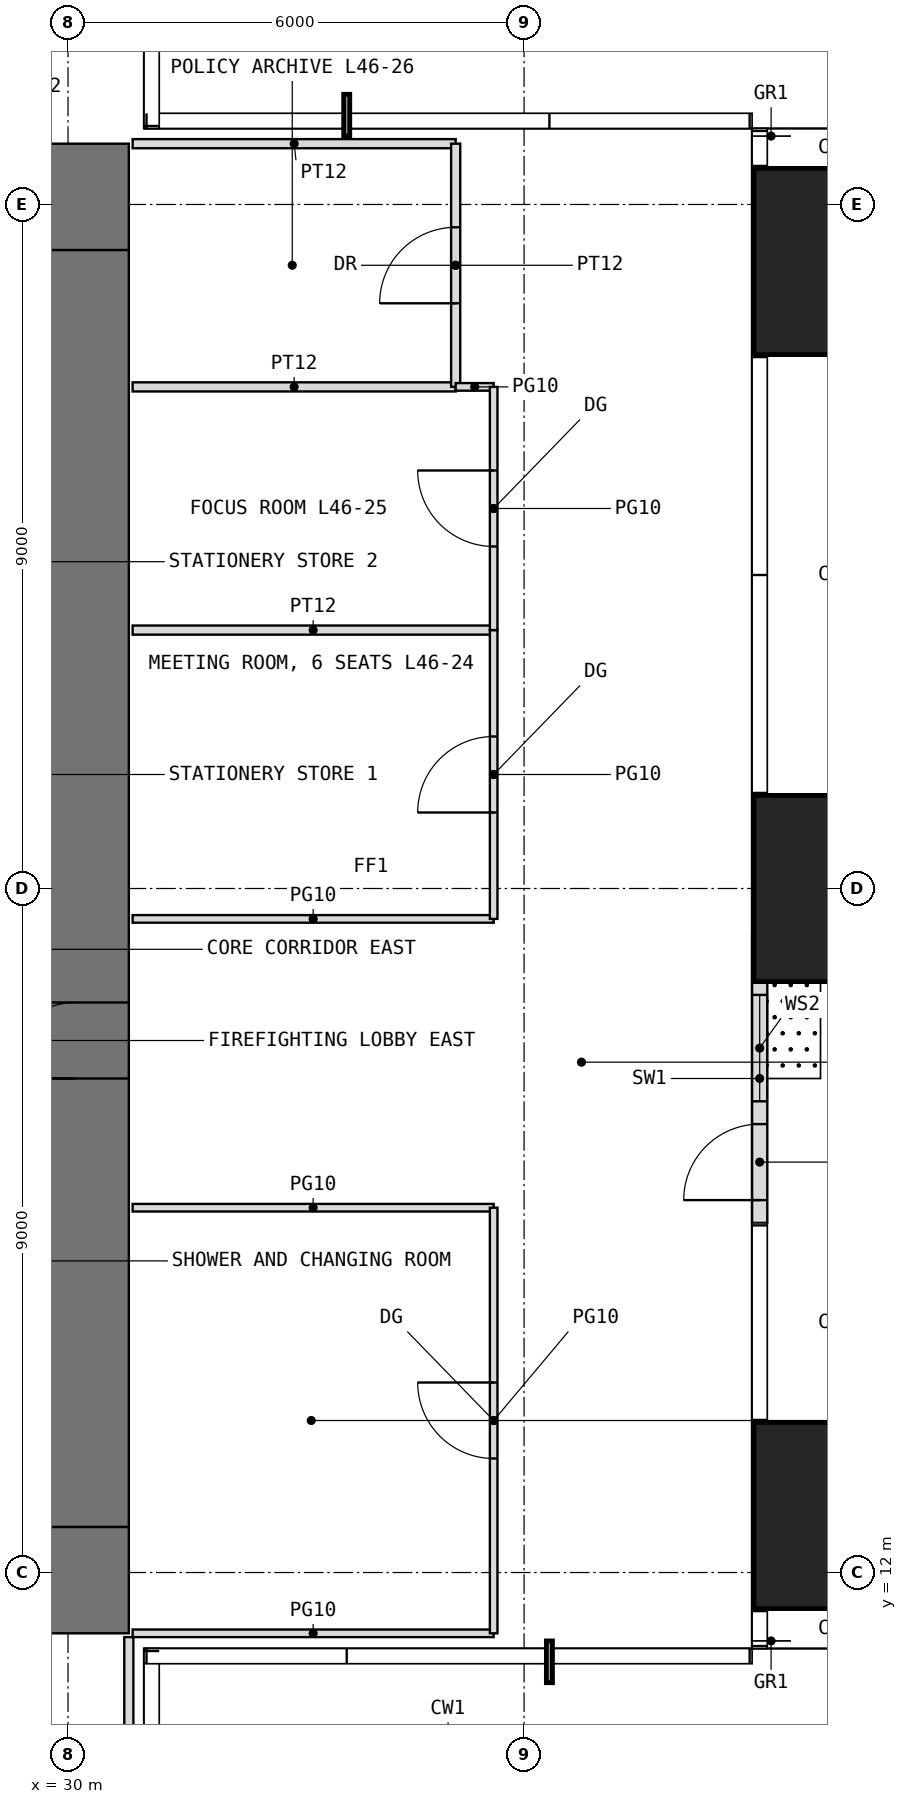
"""IFC4 building model, lengths in metres.
Left out: names, types, materials, properties, quantities, classifications, styles, units other than length and angle.
Written with IfcOpenShell. Run it as: python <this file> out.ifc"""

import sys

from ifc_helpers import new_model, si_unit, direction, frame, frame_2d, origin, origin_2d, place, context, subcontext, project, spatial, rectangle, extrude, element, fill, save


model = new_model("IFC4")
c1 = context("Model", 3, precision=1e-05, world=origin(), true_north=direction((0.0, 1.0)))
c2 = subcontext(c1, "Body", "Model", "MODEL_VIEW")
j1 = project(units=[si_unit("LENGTHUNIT", "METRE"), si_unit("PLANEANGLEUNIT", "RADIAN")], contexts=[c1])
p1 = place(None, origin())
s1 = spatial("IfcSite", under=j1, at=p1, CompositionType="ELEMENT")
p2 = place(p1, origin())
s2 = spatial("IfcBuilding", under=s1, at=p2, CompositionType="ELEMENT")
p3 = place(p2, frame((0.0, 0.0, 194.5)))
s3 = spatial("IfcBuildingStorey", under=s2, at=p3, CompositionType="ELEMENT", Elevation=194.5)
for number, where, z_axis, x_axis in (
    (1, (40.25, 12.75, 0.0), (0.0, 0.0, 1.0), (1.0, 0.0, 0.0)),
    (2, (40.25, 21.0, 0.0), (0.0, 0.0, 1.0), (1.0, 0.0, 0.0)),
    (3, (40.25, 29.25, 0.0), (0.0, 0.0, 1.0), (1.0, 0.0, 0.0)),
):
    element("IfcColumn", number, at=place(p3, frame(where, z_axis=z_axis, x_axis=x_axis)), inside=s3, PredefinedType="COLUMN", context=c2, shape_type="SweptSolid", body=[
        extrude(rectangle(XDim=2.45, YDim=2.45, at=origin_2d()), origin(), (0.0, 0.0, 1.0), 4.0),
    ])
p4 = place(p3, frame((39.1, 16.6, 0.0), z_axis=(0.0, 0.0, 1.0), x_axis=(0.0, 1.0, 0.0)))
e4 = element("IfcWall", 4, at=p4, inside=s3, PredefinedType="USERDEFINED", context=c2, shape_type="SweptSolid", body=[
    extrude(rectangle(XDim=3.8, YDim=0.2, at=frame_2d((1.9, 0.0))), origin(), (0.0, 0.0, 1.0), 3.75),
])
p5 = place(p4, frame((0.3, 0.0, 0.0)))
e5 = element("IfcOpeningElement", 5, at=p5, cuts=e4, PredefinedType="OPENING", context=c2, shape_type="SweptSolid", body=[
    extrude(rectangle(XDim=1.0, YDim=2.4, at=frame_2d((0.5, 1.2))), frame((0.0, 0.11, 0.0), z_axis=(0.0, -1.0, 0.0), x_axis=(1.0, 0.0, 0.0)), (0.0, 0.0, 1.0), 0.22),
])
p6 = place(p4, frame((1.6, 0.0, 0.3)))
e6 = element("IfcOpeningElement", 6, at=p6, cuts=e4, PredefinedType="OPENING", context=c2, shape_type="SweptSolid", body=[
    extrude(rectangle(XDim=1.4, YDim=2.7, at=frame_2d((0.7, 1.35))), frame((0.0, 0.11, 0.0), z_axis=(0.0, -1.0, 0.0), x_axis=(1.0, 0.0, 0.0)), (0.0, 0.0, 1.0), 0.22),
])
p7 = place(p3, frame((11.2, 11.9, -0.05), z_axis=(0.0, 0.0, 1.0), x_axis=(1.0, 0.0, 0.0)))
e7 = element("IfcWall", 7, at=p7, inside=s3, PredefinedType="SHEAR", context=c2, shape_type="SweptSolid", body=[
    extrude(rectangle(XDim=19.6, YDim=1.4, at=frame_2d((9.8, 0.0))), origin(), (0.0, 0.0, 1.0), 4.0),
])
p8 = place(p7, frame((8.8, 0.0, 0.05)))
e8 = element("IfcOpeningElement", 8, at=p8, cuts=e7, PredefinedType="OPENING", context=c2, shape_type="SweptSolid", body=[
    extrude(rectangle(XDim=2.0, YDim=2.2, at=frame_2d((1.0, 1.1))), frame((0.0, 0.71, 0.0), z_axis=(0.0, -1.0, 0.0), x_axis=(1.0, 0.0, 0.0)), (0.0, 0.0, 1.0), 1.42),
])
p9 = place(p3, frame((11.2, 30.1, -0.05), z_axis=(0.0, 0.0, 1.0), x_axis=(1.0, 0.0, 0.0)))
e9 = element("IfcWall", 9, at=p9, inside=s3, PredefinedType="SHEAR", context=c2, shape_type="SweptSolid", body=[
    extrude(rectangle(XDim=19.6, YDim=1.4, at=frame_2d((9.8, 0.0))), origin(), (0.0, 0.0, 1.0), 4.0),
])
p10 = place(p9, frame((8.8, 0.0, 0.05)))
e10 = element("IfcOpeningElement", 10, at=p10, cuts=e9, PredefinedType="OPENING", context=c2, shape_type="SweptSolid", body=[
    extrude(rectangle(XDim=2.0, YDim=2.2, at=frame_2d((1.0, 1.1))), frame((0.0, 0.71, 0.0), z_axis=(0.0, -1.0, 0.0), x_axis=(1.0, 0.0, 0.0)), (0.0, 0.0, 1.0), 1.42),
])
p11 = place(p3, frame((30.1, 12.6, -0.05), z_axis=(0.0, 0.0, 1.0), x_axis=(0.0, 1.0, 0.0)))
e11 = element("IfcWall", 11, at=p11, inside=s3, PredefinedType="SHEAR", context=c2, shape_type="SweptSolid", body=[
    extrude(rectangle(XDim=16.8, YDim=1.4, at=frame_2d((8.4, 0.0))), origin(), (0.0, 0.0, 1.0), 4.0),
])
p12 = place(p11, frame((5.9, 0.0, 0.05)))
e12 = element("IfcOpeningElement", 12, at=p12, cuts=e11, PredefinedType="OPENING", context=c2, shape_type="SweptSolid", body=[
    extrude(rectangle(XDim=1.0, YDim=2.2, at=frame_2d((0.5, 1.1))), frame((0.0, 0.71, 0.0), z_axis=(0.0, -1.0, 0.0), x_axis=(1.0, 0.0, 0.0)), (0.0, 0.0, 1.0), 1.42),
])
p13 = place(p3, frame((30.8, 8.2, 0.0), z_axis=(0.0, 0.0, 1.0), x_axis=(0.0, 1.0, 0.0)))
e13 = element("IfcWall", 13, at=p13, inside=s3, PredefinedType="PARTITIONING", context=c2, shape_type="SweptSolid", body=[
    extrude(rectangle(XDim=2.95, YDim=0.12, at=frame_2d((1.475, 0.0))), origin(), (0.0, 0.0, 1.0), 3.75),
])
for number, where, z_axis, x_axis in (
    (14, (30.85, 11.2, 0.0), (0.0, 0.0, 1.0), (1.0, 0.0, 0.0)),
    (15, (30.85, 16.8, 0.0), (0.0, 0.0, 1.0), (1.0, 0.0, 0.0)),
    (16, (30.85, 20.6, 0.0), (0.0, 0.0, 1.0), (1.0, 0.0, 0.0)),
):
    element("IfcWall", number, at=place(p3, frame(where, z_axis=z_axis, x_axis=x_axis)), inside=s3, PredefinedType="PARTITIONING", context=c2, shape_type="SweptSolid", body=[
        extrude(rectangle(XDim=4.75, YDim=0.1, at=frame_2d((2.375, 0.0))), origin(), (0.0, 0.0, 1.0), 3.75),
    ])
p14 = place(p3, frame((30.85, 24.4, 0.0), z_axis=(0.0, 0.0, 1.0), x_axis=(1.0, 0.0, 0.0)))
e17 = element("IfcWall", 17, at=p14, inside=s3, PredefinedType="PARTITIONING", context=c2, shape_type="SweptSolid", body=[
    extrude(rectangle(XDim=4.75, YDim=0.12, at=frame_2d((2.375, 0.0))), origin(), (0.0, 0.0, 1.0), 3.75),
])
for number, where, z_axis, x_axis in (
    (18, (30.85, 27.6, 0.0), (0.0, 0.0, 1.0), (1.0, 0.0, 0.0)),
    (19, (30.85, 30.8, 0.0), (0.0, 0.0, 1.0), (1.0, 0.0, 0.0)),
):
    element("IfcWall", number, at=place(p3, frame(where, z_axis=z_axis, x_axis=x_axis)), inside=s3, PredefinedType="PARTITIONING", context=c2, shape_type="SweptSolid", body=[
        extrude(rectangle(XDim=4.25, YDim=0.12, at=frame_2d((2.125, 0.0))), origin(), (0.0, 0.0, 1.0), 3.75),
    ])
p15 = place(p3, frame((35.1, 27.6, 0.0), z_axis=(0.0, 0.0, 1.0), x_axis=(0.0, 1.0, 0.0)))
e20 = element("IfcWall", 20, at=p15, inside=s3, PredefinedType="PARTITIONING", context=c2, shape_type="SweptSolid", body=[
    extrude(rectangle(XDim=3.2, YDim=0.12, at=frame_2d((1.6, 0.0))), origin(), (0.0, 0.0, 1.0), 3.75),
])
p16 = place(p15, frame((1.1, 0.0, 0.0)))
e21 = element("IfcOpeningElement", 21, at=p16, cuts=e20, PredefinedType="OPENING", context=c2, shape_type="SweptSolid", body=[
    extrude(rectangle(XDim=1.0, YDim=2.2, at=frame_2d((0.5, 1.1))), frame((0.0, 0.07, 0.0), z_axis=(0.0, -1.0, 0.0), x_axis=(1.0, 0.0, 0.0)), (0.0, 0.0, 1.0), 0.14),
])
p17 = place(p3, frame((35.1, 27.6, 0.0), z_axis=(0.0, 0.0, 1.0), x_axis=(1.0, 0.0, 0.0)))
e22 = element("IfcWall", 22, at=p17, inside=s3, PredefinedType="PARTITIONING", context=c2, shape_type="SweptSolid", body=[
    extrude(rectangle(XDim=0.5, YDim=0.1, at=frame_2d((0.25, 0.0))), origin(), (0.0, 0.0, 1.0), 3.75),
])
p18 = place(p3, frame((35.6, 11.2, 0.0), z_axis=(0.0, 0.0, 1.0), x_axis=(0.0, 1.0, 0.0)))
e23 = element("IfcWall", 23, at=p18, inside=s3, PredefinedType="PARTITIONING", context=c2, shape_type="SweptSolid", body=[
    extrude(rectangle(XDim=5.6, YDim=0.1, at=frame_2d((2.8, 0.0))), origin(), (0.0, 0.0, 1.0), 3.75),
])
p19 = place(p18, frame((2.3, 0.0, 0.0)))
e24 = element("IfcOpeningElement", 24, at=p19, cuts=e23, PredefinedType="OPENING", context=c2, shape_type="SweptSolid", body=[
    extrude(rectangle(XDim=1.0, YDim=2.4, at=frame_2d((0.5, 1.2))), frame((0.0, 0.06, 0.0), z_axis=(0.0, -1.0, 0.0), x_axis=(1.0, 0.0, 0.0)), (0.0, 0.0, 1.0), 0.12),
])
p20 = place(p3, frame((35.6, 20.6, 0.0), z_axis=(0.0, 0.0, 1.0), x_axis=(0.0, 1.0, 0.0)))
e25 = element("IfcWall", 25, at=p20, inside=s3, PredefinedType="PARTITIONING", context=c2, shape_type="SweptSolid", body=[
    extrude(rectangle(XDim=3.8, YDim=0.1, at=frame_2d((1.9, 0.0))), origin(), (0.0, 0.0, 1.0), 3.75),
])
p21 = place(p20, frame((1.4, 0.0, 0.0)))
e26 = element("IfcOpeningElement", 26, at=p21, cuts=e25, PredefinedType="OPENING", context=c2, shape_type="SweptSolid", body=[
    extrude(rectangle(XDim=1.0, YDim=2.4, at=frame_2d((0.5, 1.2))), frame((0.0, 0.06, 0.0), z_axis=(0.0, -1.0, 0.0), x_axis=(1.0, 0.0, 0.0)), (0.0, 0.0, 1.0), 0.12),
])
p22 = place(p3, frame((35.6, 24.4, 0.0), z_axis=(0.0, 0.0, 1.0), x_axis=(0.0, 1.0, 0.0)))
e27 = element("IfcWall", 27, at=p22, inside=s3, PredefinedType="PARTITIONING", context=c2, shape_type="SweptSolid", body=[
    extrude(rectangle(XDim=3.2, YDim=0.1, at=frame_2d((1.6, 0.0))), origin(), (0.0, 0.0, 1.0), 3.75),
])
p23 = place(p22, frame((1.1, 0.0, 0.0)))
e28 = element("IfcOpeningElement", 28, at=p23, cuts=e27, PredefinedType="OPENING", context=c2, shape_type="SweptSolid", body=[
    extrude(rectangle(XDim=1.0, YDim=2.4, at=frame_2d((0.5, 1.2))), frame((0.0, 0.06, 0.0), z_axis=(0.0, -1.0, 0.0), x_axis=(1.0, 0.0, 0.0)), (0.0, 0.0, 1.0), 0.12),
])
p24 = place(p5, origin())
e29 = element("IfcDoor", 29, at=p24, inside=s3, OperationType="SINGLE_SWING_LEFT", PredefinedType="DOOR", context=c2, shape_type="SweptSolid", body=[
    extrude(rectangle(XDim=1.0, YDim=2.4, at=frame_2d((0.5, 1.2))), frame((0.0, 0.025, 0.0), z_axis=(0.0, -1.0, 0.0), x_axis=(1.0, 0.0, 0.0)), (0.0, 0.0, 1.0), 0.05),
])
fill(e5, e29)
p25 = place(p6, origin())
e30 = element("IfcWindow", 30, at=p25, inside=s3, PartitioningType="SINGLE_PANEL", PredefinedType="WINDOW", context=c2, shape_type="SweptSolid", body=[
    extrude(rectangle(XDim=1.4, YDim=2.7, at=frame_2d((0.7, 1.35))), frame((0.0, 0.03, 0.0), z_axis=(0.0, -1.0, 0.0), x_axis=(1.0, 0.0, 0.0)), (0.0, 0.0, 1.0), 0.06),
])
fill(e6, e30)
p26 = place(p12, origin())
e31 = element("IfcDoor", 31, at=p26, inside=s3, OperationType="SINGLE_SWING_LEFT", PredefinedType="DOOR", context=c2, shape_type="SweptSolid", body=[
    extrude(rectangle(XDim=1.0, YDim=2.2, at=frame_2d((0.5, 1.1))), frame((0.0, 0.025, 0.0), z_axis=(0.0, -1.0, 0.0), x_axis=(1.0, 0.0, 0.0)), (0.0, 0.0, 1.0), 0.05),
])
fill(e12, e31)
p27 = place(p19, origin())
e32 = element("IfcDoor", 32, at=p27, inside=s3, OperationType="SINGLE_SWING_RIGHT", PredefinedType="DOOR", context=c2, shape_type="SweptSolid", body=[
    extrude(rectangle(XDim=1.0, YDim=2.4, at=frame_2d((0.5, 1.2))), frame((0.0, 0.025, 0.0), z_axis=(0.0, -1.0, 0.0), x_axis=(1.0, 0.0, 0.0)), (0.0, 0.0, 1.0), 0.05),
])
fill(e24, e32)
p28 = place(p21, origin())
e33 = element("IfcDoor", 33, at=p28, inside=s3, OperationType="SINGLE_SWING_LEFT", PredefinedType="DOOR", context=c2, shape_type="SweptSolid", body=[
    extrude(rectangle(XDim=1.0, YDim=2.4, at=frame_2d((0.5, 1.2))), frame((0.0, 0.025, 0.0), z_axis=(0.0, -1.0, 0.0), x_axis=(1.0, 0.0, 0.0)), (0.0, 0.0, 1.0), 0.05),
])
fill(e26, e33)
p29 = place(p23, origin())
e34 = element("IfcDoor", 34, at=p29, inside=s3, OperationType="SINGLE_SWING_RIGHT", PredefinedType="DOOR", context=c2, shape_type="SweptSolid", body=[
    extrude(rectangle(XDim=1.0, YDim=2.4, at=frame_2d((0.5, 1.2))), frame((0.0, 0.025, 0.0), z_axis=(0.0, -1.0, 0.0), x_axis=(1.0, 0.0, 0.0)), (0.0, 0.0, 1.0), 0.05),
])
fill(e28, e34)
p30 = place(p16, origin())
e35 = element("IfcDoor", 35, at=p30, inside=s3, OperationType="SINGLE_SWING_LEFT", PredefinedType="DOOR", context=c2, shape_type="SweptSolid", body=[
    extrude(rectangle(XDim=1.0, YDim=2.2, at=frame_2d((0.5, 1.1))), frame((0.0, 0.025, 0.0), z_axis=(0.0, -1.0, 0.0), x_axis=(1.0, 0.0, 0.0)), (0.0, 0.0, 1.0), 0.05),
])
fill(e21, e35)
save(model, sys.argv[1])
